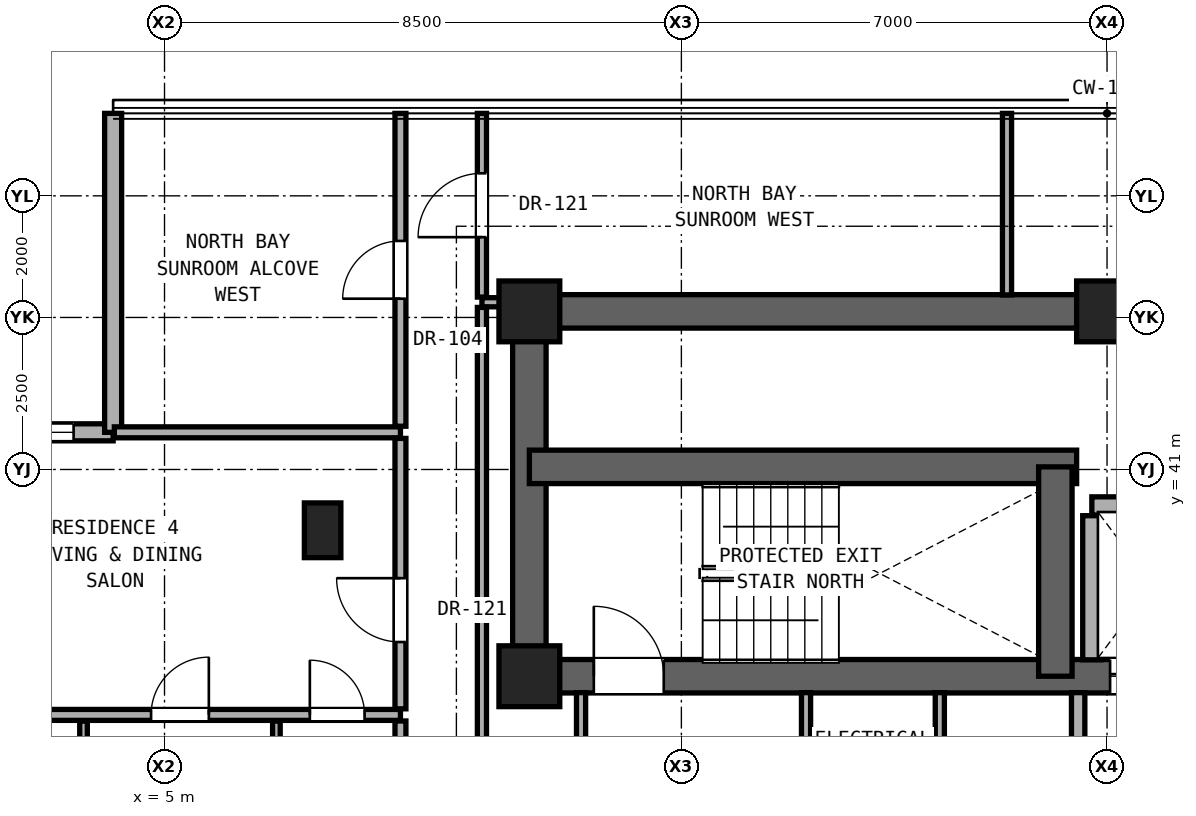
"""IFC4 building model, lengths in metres.
Left out: names, types, materials, properties, quantities, classifications, styles, units other than length and angle.
Written with IfcOpenShell. Run it as: python <this file> out.ifc"""

import sys

from ifc_helpers import new_model, si_unit, direction, frame, frame_2d, origin, origin_2d, place, context, subcontext, project, spatial, rectangle, extrude, element, fill, save


model = new_model("IFC4")
c1 = context("Model", 3, precision=1e-05, world=origin(), true_north=direction((0.0, 1.0)))
c2 = subcontext(c1, "Body", "Model", "MODEL_VIEW")
j1 = project(units=[si_unit("LENGTHUNIT", "METRE"), si_unit("PLANEANGLEUNIT", "RADIAN")], contexts=[c1])
p1 = place(None, origin())
s1 = spatial("IfcSite", under=j1, at=p1, CompositionType="ELEMENT")
p2 = place(p1, origin())
s2 = spatial("IfcBuilding", under=s1, at=p2, CompositionType="ELEMENT")
p3 = place(p2, frame((0.0, 0.0, 177.15)))
s3 = spatial("IfcBuildingStorey", under=s2, at=p3, CompositionType="ELEMENT", Elevation=177.15)
for number, where, z_axis, x_axis in (
    (1, (11.0, 37.6, 0.0), (0.0, 0.0, 1.0), (1.0, 0.0, 0.0)),
    (2, (11.0, 43.6, 0.0), (0.0, 0.0, 1.0), (1.0, 0.0, 0.0)),
    (3, (20.5, 43.6, 0.0), (0.0, 0.0, 1.0), (1.0, 0.0, 0.0)),
):
    element("IfcColumn", number, at=place(p3, frame(where, z_axis=z_axis, x_axis=x_axis)), inside=s3, PredefinedType="COLUMN", context=c2, shape_type="SweptSolid", body=[
        extrude(rectangle(XDim=1.0, YDim=1.0, at=origin_2d()), origin(), (0.0, 0.0, 1.0), 3.25),
    ])
p4 = place(p3, frame((7.6, 40.0, 0.0), z_axis=(0.0, 0.0, 1.0), x_axis=(1.0, 0.0, 0.0)))
e4 = element("IfcColumn", 4, at=p4, inside=s3, PredefinedType="PILASTER", context=c2, shape_type="SweptSolid", body=[
    extrude(rectangle(XDim=0.6, YDim=0.9, at=origin_2d()), origin(), (0.0, 0.0, 1.0), 3.25),
])
p5 = place(p3, frame((11.0, 43.6, 0.0), z_axis=(0.0, 0.0, 1.0), x_axis=(1.0, 0.0, 0.0)))
e5 = element("IfcWall", 5, at=p5, inside=s3, PredefinedType="SHEAR", context=c2, shape_type="SweptSolid", body=[
    extrude(rectangle(XDim=19.0, YDim=0.55, at=frame_2d((9.5, 0.0))), origin(), (0.0, 0.0, 1.0), 3.05),
])
p6 = place(p3, frame((11.0, 37.6, 0.0), z_axis=(0.0, 0.0, 1.0), x_axis=(0.0, 1.0, 0.0)))
e6 = element("IfcWall", 6, at=p6, inside=s3, PredefinedType="SHEAR", context=c2, shape_type="SweptSolid", body=[
    extrude(rectangle(XDim=6.0, YDim=0.55, at=frame_2d((3.0, 0.0))), origin(), (0.0, 0.0, 1.0), 3.05),
])
p7 = place(p3, frame((11.0, 37.6, 0.0), z_axis=(0.0, 0.0, 1.0), x_axis=(1.0, 0.0, 0.0)))
e7 = element("IfcWall", 7, at=p7, inside=s3, PredefinedType="SHEAR", context=c2, shape_type="SweptSolid", body=[
    extrude(rectangle(XDim=19.0, YDim=0.55, at=frame_2d((9.5, 0.0))), origin(), (0.0, 0.0, 1.0), 3.05),
])
p8 = place(p7, frame((1.06, 0.0, 0.0)))
e8 = element("IfcOpeningElement", 8, at=p8, cuts=e7, PredefinedType="OPENING", context=c2, shape_type="SweptSolid", body=[
    extrude(rectangle(XDim=1.15, YDim=2.2, at=frame_2d((0.575, 1.1))), frame((0.0, 0.285, 0.0), z_axis=(0.0, -1.0, 0.0), x_axis=(1.0, 0.0, 0.0)), (0.0, 0.0, 1.0), 0.57),
])
p9 = place(p7, frame((9.55, 0.0, 0.0)))
e9 = element("IfcOpeningElement", 9, at=p9, cuts=e7, PredefinedType="OPENING", context=c2, shape_type="SweptSolid", body=[
    extrude(rectangle(XDim=1.4, YDim=2.35, at=frame_2d((0.7, 1.175))), frame((0.0, 0.285, 0.0), z_axis=(0.0, -1.0, 0.0), x_axis=(1.0, 0.0, 0.0)), (0.0, 0.0, 1.0), 0.57),
])
p10 = place(p7, frame((11.95, 0.0, 0.0)))
e10 = element("IfcOpeningElement", 10, at=p10, cuts=e7, PredefinedType="OPENING", context=c2, shape_type="SweptSolid", body=[
    extrude(rectangle(XDim=1.4, YDim=2.35, at=frame_2d((0.7, 1.175))), frame((0.0, 0.285, 0.0), z_axis=(0.0, -1.0, 0.0), x_axis=(1.0, 0.0, 0.0)), (0.0, 0.0, 1.0), 0.57),
])
p11 = place(p3, frame((11.0, 41.043, 0.0), z_axis=(0.0, 0.0, 1.0), x_axis=(1.0, 0.0, 0.0)))
e11 = element("IfcWall", 11, at=p11, inside=s3, PredefinedType="SHEAR", context=c2, shape_type="SweptSolid", body=[
    extrude(rectangle(XDim=9.0, YDim=0.55, at=frame_2d((4.5, 0.0))), origin(), (0.0, 0.0, 1.0), 3.05),
])
p12 = place(p3, frame((19.65, 37.6, 0.0), z_axis=(0.0, 0.0, 1.0), x_axis=(0.0, 1.0, 0.0)))
e12 = element("IfcWall", 12, at=p12, inside=s3, PredefinedType="SHEAR", context=c2, shape_type="SweptSolid", body=[
    extrude(rectangle(XDim=3.443, YDim=0.55, at=frame_2d((1.721, 0.0))), origin(), (0.0, 0.0, 1.0), 3.05),
])
p13 = place(p3, frame((4.155, 41.611, 0.0), z_axis=(0.0, 0.0, 1.0), x_axis=(-1.0, 0.0, 0.0)))
e13 = element("IfcWall", 13, at=p13, inside=s3, PredefinedType="SOLIDWALL", context=c2, shape_type="SweptSolid", body=[
    extrude(rectangle(XDim=5.245, YDim=0.28, at=frame_2d((2.623, 0.0))), origin(), (0.0, 0.0, 1.0), 3.03),
])
p14 = place(p13, frame((0.65, 0.0, 0.85)))
e14 = element("IfcOpeningElement", 14, at=p14, cuts=e13, PredefinedType="OPENING", context=c2, shape_type="SweptSolid", body=[
    extrude(rectangle(XDim=1.1, YDim=2.0, at=frame_2d((0.55, 1.0))), frame((0.0, 0.15, 0.0), z_axis=(0.0, -1.0, 0.0), x_axis=(1.0, 0.0, 0.0)), (0.0, 0.0, 1.0), 0.3),
])
p15 = place(p3, frame((4.155, 46.856, 0.0), z_axis=(0.0, 0.0, 1.0), x_axis=(0.0, -1.0, 0.0)))
e15 = element("IfcWall", 15, at=p15, inside=s3, PredefinedType="SOLIDWALL", context=c2, shape_type="SweptSolid", body=[
    extrude(rectangle(XDim=5.245, YDim=0.28, at=frame_2d((2.623, 0.0))), origin(), (0.0, 0.0, 1.0), 3.03),
])
p16 = place(p3, frame((-1.09, 36.964, 0.0), z_axis=(0.0, 0.0, 1.0), x_axis=(1.0, 0.0, 0.0)))
e16 = element("IfcWall", 16, at=p16, inside=s3, PredefinedType="PARTITIONING", context=c2, shape_type="SweptSolid", body=[
    extrude(rectangle(XDim=9.97, YDim=0.18, at=frame_2d((4.985, 0.0))), origin(), (0.0, 0.0, 1.0), 2.269),
])
p17 = place(p16, frame((1.624, 0.0, 0.0)))
e17 = element("IfcOpeningElement", 17, at=p17, cuts=e16, PredefinedType="OPENING", context=c2, shape_type="SweptSolid", body=[
    extrude(rectangle(XDim=0.95, YDim=2.15, at=frame_2d((0.475, 1.075))), frame((0.0, 0.1, 0.0), z_axis=(0.0, -1.0, 0.0), x_axis=(1.0, 0.0, 0.0)), (0.0, 0.0, 1.0), 0.2),
])
p18 = place(p16, frame((5.869, 0.0, 0.0)))
e18 = element("IfcOpeningElement", 18, at=p18, cuts=e16, PredefinedType="OPENING", context=c2, shape_type="SweptSolid", body=[
    extrude(rectangle(XDim=0.95, YDim=2.15, at=frame_2d((0.475, 1.075))), frame((0.0, 0.1, 0.0), z_axis=(0.0, -1.0, 0.0), x_axis=(1.0, 0.0, 0.0)), (0.0, 0.0, 1.0), 0.2),
])
p19 = place(p16, frame((8.48, 0.0, 0.0)))
e19 = element("IfcOpeningElement", 19, at=p19, cuts=e16, PredefinedType="OPENING", context=c2, shape_type="SweptSolid", body=[
    extrude(rectangle(XDim=0.9, YDim=2.1, at=frame_2d((0.45, 1.05))), frame((0.0, 0.1, 0.0), z_axis=(0.0, -1.0, 0.0), x_axis=(1.0, 0.0, 0.0)), (0.0, 0.0, 1.0), 0.2),
])
p20 = place(p3, frame((20.25, 40.4, 0.0), z_axis=(0.0, 0.0, 1.0), x_axis=(1.0, 0.0, 0.0)))
e20 = element("IfcWall", 20, at=p20, inside=s3, PredefinedType="SOLIDWALL", context=c2, shape_type="SweptSolid", body=[
    extrude(rectangle(XDim=4.4, YDim=0.3, at=frame_2d((2.2, 0.0))), origin(), (0.0, 0.0, 1.0), 3.05),
])
p21 = place(p3, frame((4.175, 41.611, 0.0), z_axis=(0.0, 0.0, 1.0), x_axis=(1.0, 0.0, 0.0)))
e21 = element("IfcWall", 21, at=p21, inside=s3, PredefinedType="PARTITIONING", context=c2, shape_type="SweptSolid", body=[
    extrude(rectangle(XDim=4.705, YDim=0.18, at=frame_2d((2.353, 0.0))), origin(), (0.0, 0.0, 1.0), 3.05),
])
p22 = place(p3, frame((10.22, 43.75, 0.0), z_axis=(0.0, 0.0, 1.0), x_axis=(1.0, 0.0, 0.0)))
e22 = element("IfcWall", 22, at=p22, inside=s3, PredefinedType="PARTITIONING", context=c2, shape_type="SweptSolid", body=[
    extrude(rectangle(XDim=0.51, YDim=0.15, at=frame_2d((0.255, 0.0))), origin(), (0.0, 0.0, 1.0), 3.05),
])
for number, where, z_axis, x_axis in (
    (23, (3.668, 34.344, 0.0), (0.0, 0.0, 1.0), (0.0, 1.0, 0.0)),
    (24, (6.84, 34.344, 0.0), (0.0, 0.0, 1.0), (0.0, 1.0, 0.0)),
):
    element("IfcWall", number, at=place(p3, frame(where, z_axis=z_axis, x_axis=x_axis)), inside=s3, PredefinedType="PARTITIONING", context=c2, shape_type="SweptSolid", body=[
        extrude(rectangle(XDim=2.52, YDim=0.125, at=frame_2d((1.26, 0.0))), origin(), (0.0, 0.0, 1.0), 3.05),
    ])
p23 = place(p3, frame((8.88, 34.344, 0.0), z_axis=(0.0, 0.0, 1.0), x_axis=(0.0, 1.0, 0.0)))
e25 = element("IfcWall", 25, at=p23, inside=s3, PredefinedType="PARTITIONING", context=c2, shape_type="SweptSolid", body=[
    extrude(rectangle(XDim=2.52, YDim=0.18, at=frame_2d((1.26, 0.0))), origin(), (0.0, 0.0, 1.0), 3.05),
])
p24 = place(p3, frame((8.88, 37.064, 0.0), z_axis=(0.0, 0.0, 1.0), x_axis=(0.0, 1.0, 0.0)))
e26 = element("IfcWall", 26, at=p24, inside=s3, PredefinedType="PARTITIONING", context=c2, shape_type="SweptSolid", body=[
    extrude(rectangle(XDim=4.447, YDim=0.18, at=frame_2d((2.224, 0.0))), origin(), (0.0, 0.0, 1.0), 2.442),
])
p25 = place(p24, frame((1.098, 0.0, 0.0)))
e27 = element("IfcOpeningElement", 27, at=p25, cuts=e26, PredefinedType="OPENING", context=c2, shape_type="SweptSolid", body=[
    extrude(rectangle(XDim=1.05, YDim=2.2, at=frame_2d((0.525, 1.1))), frame((0.0, 0.1, 0.0), z_axis=(0.0, -1.0, 0.0), x_axis=(1.0, 0.0, 0.0)), (0.0, 0.0, 1.0), 0.2),
])
p26 = place(p3, frame((8.88, 41.711, 0.0), z_axis=(0.0, 0.0, 1.0), x_axis=(0.0, 1.0, 0.0)))
e28 = element("IfcWall", 28, at=p26, inside=s3, PredefinedType="PARTITIONING", context=c2, shape_type="SweptSolid", body=[
    extrude(rectangle(XDim=5.145, YDim=0.18, at=frame_2d((2.573, 0.0))), origin(), (0.0, 0.0, 1.0), 3.05),
])
p27 = place(p26, frame((2.097, 0.0, 0.0)))
e29 = element("IfcOpeningElement", 29, at=p27, cuts=e28, PredefinedType="OPENING", context=c2, shape_type="SweptSolid", body=[
    extrude(rectangle(XDim=0.95, YDim=2.15, at=frame_2d((0.475, 1.075))), frame((0.0, 0.1, 0.0), z_axis=(0.0, -1.0, 0.0), x_axis=(1.0, 0.0, 0.0)), (0.0, 0.0, 1.0), 0.2),
])
p28 = place(p3, frame((10.22, 34.535, 0.0), z_axis=(0.0, 0.0, 1.0), x_axis=(0.0, 1.0, 0.0)))
e30 = element("IfcWall", 30, at=p28, inside=s3, PredefinedType="PARTITIONING", context=c2, shape_type="SweptSolid", body=[
    extrude(rectangle(XDim=9.13, YDim=0.15, at=frame_2d((4.565, 0.0))), origin(), (0.0, 0.0, 1.0), 2.442),
])
p29 = place(p3, frame((10.22, 43.835, 0.0), z_axis=(0.0, 0.0, 1.0), x_axis=(0.0, 1.0, 0.0)))
e31 = element("IfcWall", 31, at=p29, inside=s3, PredefinedType="PARTITIONING", context=c2, shape_type="SweptSolid", body=[
    extrude(rectangle(XDim=3.021, YDim=0.15, at=frame_2d((1.51, 0.0))), origin(), (0.0, 0.0, 1.0), 3.05),
])
p30 = place(p29, frame((0.986, 0.0, 0.0)))
e32 = element("IfcOpeningElement", 32, at=p30, cuts=e31, PredefinedType="OPENING", context=c2, shape_type="SweptSolid", body=[
    extrude(rectangle(XDim=1.05, YDim=2.2, at=frame_2d((0.525, 1.1))), frame((0.0, 0.085, 0.0), z_axis=(0.0, -1.0, 0.0), x_axis=(1.0, 0.0, 0.0)), (0.0, 0.0, 1.0), 0.17),
])
p31 = place(p3, frame((11.85, 34.535, 0.0), z_axis=(0.0, 0.0, 1.0), x_axis=(0.0, 1.0, 0.0)))
e33 = element("IfcWall", 33, at=p31, inside=s3, PredefinedType="PARTITIONING", context=c2, shape_type="SweptSolid", body=[
    extrude(rectangle(XDim=2.795, YDim=0.15, at=frame_2d((1.397, 0.0))), origin(), (0.0, 0.0, 1.0), 3.05),
])
for number, where, z_axis, x_axis in (
    (34, (15.55, 34.57, 0.0), (0.0, 0.0, 1.0), (0.0, 1.0, 0.0)),
    (35, (17.75, 34.57, 0.0), (0.0, 0.0, 1.0), (0.0, 1.0, 0.0)),
):
    element("IfcWall", number, at=place(p3, frame(where, z_axis=z_axis, x_axis=x_axis)), inside=s3, PredefinedType="PARTITIONING", context=c2, shape_type="SweptSolid", body=[
        extrude(rectangle(XDim=2.76, YDim=0.15, at=frame_2d((1.38, 0.0))), origin(), (0.0, 0.0, 1.0), 3.05),
    ])
p32 = place(p3, frame((18.855, 43.87, 0.0), z_axis=(0.0, 0.0, 1.0), x_axis=(0.0, 1.0, 0.0)))
e36 = element("IfcWall", 36, at=p32, inside=s3, PredefinedType="PARTITIONING", context=c2, shape_type="SweptSolid", body=[
    extrude(rectangle(XDim=2.986, YDim=0.15, at=frame_2d((1.493, 0.0))), origin(), (0.0, 0.0, 1.0), 3.05),
])
p33 = place(p3, frame((20.025, 34.57, 0.0), z_axis=(0.0, 0.0, 1.0), x_axis=(0.0, 1.0, 0.0)))
e37 = element("IfcWall", 37, at=p33, inside=s3, PredefinedType="SOLIDWALL", context=c2, shape_type="SweptSolid", body=[
    extrude(rectangle(XDim=2.76, YDim=0.22, at=frame_2d((1.38, 0.0))), origin(), (0.0, 0.0, 1.0), 3.05),
])
p34 = place(p3, frame((20.25, 37.87, 0.0), z_axis=(0.0, 0.0, 1.0), x_axis=(0.0, 1.0, 0.0)))
e38 = element("IfcWall", 38, at=p34, inside=s3, PredefinedType="SOLIDWALL", context=c2, shape_type="SweptSolid", body=[
    extrude(rectangle(XDim=2.37, YDim=0.3, at=frame_2d((1.185, 0.0))), origin(), (0.0, 0.0, 1.0), 3.05),
])
p35 = place(p14, origin())
e39 = element("IfcWindow", 39, at=p35, inside=s3, PartitioningType="SINGLE_PANEL", PredefinedType="WINDOW", context=c2, shape_type="SweptSolid", body=[
    extrude(rectangle(XDim=1.1, YDim=2.0, at=frame_2d((0.55, 1.0))), frame((0.0, 0.03, 0.0), z_axis=(0.0, -1.0, 0.0), x_axis=(1.0, 0.0, 0.0)), (0.0, 0.0, 1.0), 0.06),
])
fill(e14, e39)
p36 = place(p8, origin())
e40 = element("IfcDoor", 40, at=p36, inside=s3, OperationType="SINGLE_SWING_LEFT", PredefinedType="DOOR", context=c2, shape_type="SweptSolid", body=[
    extrude(rectangle(XDim=1.15, YDim=2.2, at=frame_2d((0.575, 1.1))), frame((0.0, 0.025, 0.0), z_axis=(0.0, -1.0, 0.0), x_axis=(1.0, 0.0, 0.0)), (0.0, 0.0, 1.0), 0.05),
])
fill(e8, e40)
p37 = place(p25, origin())
e41 = element("IfcDoor", 41, at=p37, inside=s3, OperationType="SINGLE_SWING_RIGHT", PredefinedType="DOOR", context=c2, shape_type="SweptSolid", body=[
    extrude(rectangle(XDim=1.05, YDim=2.2, at=frame_2d((0.525, 1.1))), frame((0.0, 0.025, 0.0), z_axis=(0.0, -1.0, 0.0), x_axis=(1.0, 0.0, 0.0)), (0.0, 0.0, 1.0), 0.05),
])
fill(e27, e41)
p38 = place(p18, origin())
e42 = element("IfcDoor", 42, at=p38, inside=s3, OperationType="SINGLE_SWING_RIGHT", PredefinedType="DOOR", context=c2, shape_type="SweptSolid", body=[
    extrude(rectangle(XDim=0.95, YDim=2.15, at=frame_2d((0.475, 1.075))), frame((0.0, 0.025, 0.0), z_axis=(0.0, -1.0, 0.0), x_axis=(1.0, 0.0, 0.0)), (0.0, 0.0, 1.0), 0.05),
])
fill(e18, e42)
p39 = place(p19, origin())
e43 = element("IfcDoor", 43, at=p39, inside=s3, OperationType="SINGLE_SWING_LEFT", PredefinedType="DOOR", context=c2, shape_type="SweptSolid", body=[
    extrude(rectangle(XDim=0.9, YDim=2.1, at=frame_2d((0.45, 1.05))), frame((0.0, 0.025, 0.0), z_axis=(0.0, -1.0, 0.0), x_axis=(1.0, 0.0, 0.0)), (0.0, 0.0, 1.0), 0.05),
])
fill(e19, e43)
p40 = place(p30, origin())
e44 = element("IfcDoor", 44, at=p40, inside=s3, OperationType="SINGLE_SWING_LEFT", PredefinedType="DOOR", context=c2, shape_type="SweptSolid", body=[
    extrude(rectangle(XDim=1.05, YDim=2.2, at=frame_2d((0.525, 1.1))), frame((0.0, 0.025, 0.0), z_axis=(0.0, -1.0, 0.0), x_axis=(1.0, 0.0, 0.0)), (0.0, 0.0, 1.0), 0.05),
])
fill(e32, e44)
p41 = place(p27, origin())
e45 = element("IfcDoor", 45, at=p41, inside=s3, OperationType="SINGLE_SWING_LEFT", PredefinedType="DOOR", context=c2, shape_type="SweptSolid", body=[
    extrude(rectangle(XDim=0.95, YDim=2.15, at=frame_2d((0.475, 1.075))), frame((0.0, 0.025, 0.0), z_axis=(0.0, -1.0, 0.0), x_axis=(1.0, 0.0, 0.0)), (0.0, 0.0, 1.0), 0.05),
])
fill(e29, e45)
p42 = place(p9, origin())
e46 = element("IfcDoor", 46, at=p42, inside=s3, OperationType="DOUBLE_DOOR_SLIDING", PredefinedType="DOOR", context=c2, shape_type="SweptSolid", body=[
    extrude(rectangle(XDim=1.4, YDim=2.35, at=frame_2d((0.7, 1.175))), frame((0.0, 0.025, 0.0), z_axis=(0.0, -1.0, 0.0), x_axis=(1.0, 0.0, 0.0)), (0.0, 0.0, 1.0), 0.05),
])
fill(e9, e46)
save(model, sys.argv[1])
